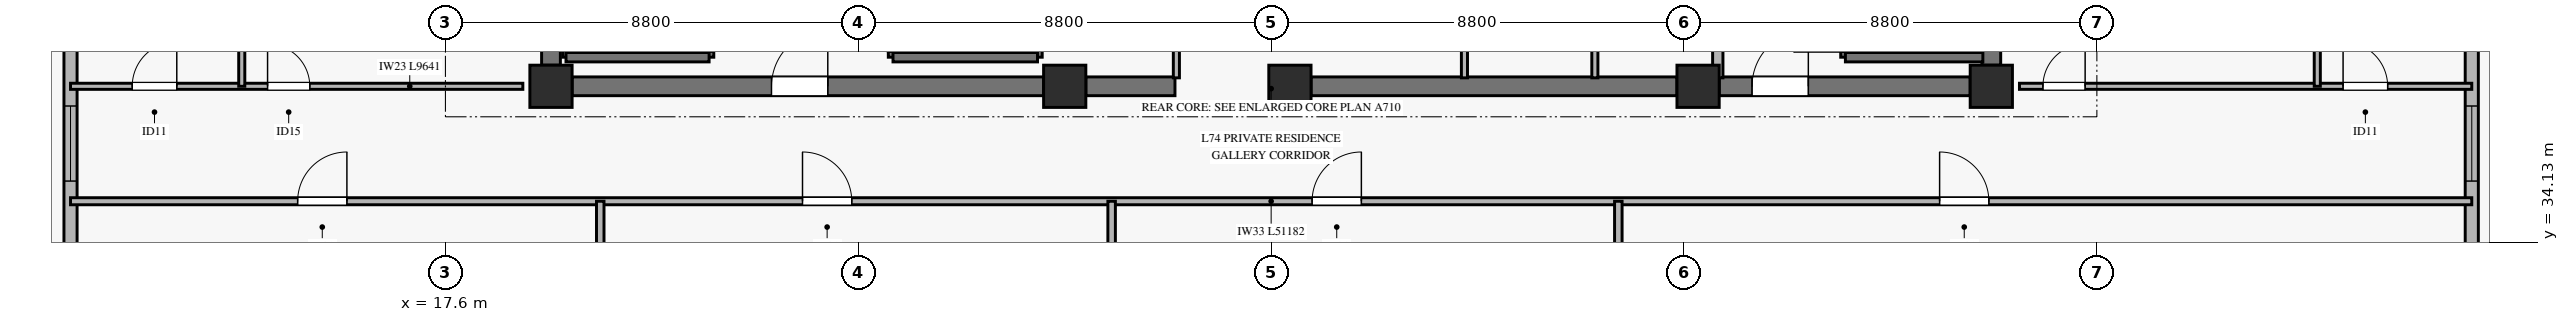
"""IFC4 building model, lengths in metres.
Left out: names, types, materials, properties, quantities, classifications, styles, units other than length and angle.
Written with IfcOpenShell. Run it as: python <this file> out.ifc"""

import sys

from ifc_helpers import new_model, si_unit, direction, frame, frame_2d, origin, origin_2d, place, context, subcontext, project, spatial, rectangle, extrude, source, transform, mapped, element, fill, save


model = new_model("IFC4")
c1 = context("Model", 3, precision=1e-05, world=origin(), true_north=direction((0.0, 1.0)))
c2 = subcontext(c1, "Body", "Model", "MODEL_VIEW")
j1 = project(units=[si_unit("LENGTHUNIT", "METRE"), si_unit("PLANEANGLEUNIT", "RADIAN")], contexts=[c1])
p1 = place(None, origin())
s1 = spatial("IfcSite", under=j1, at=p1, CompositionType="ELEMENT")
p2 = place(p1, origin())
s2 = spatial("IfcBuilding", under=s1, at=p2, CompositionType="ELEMENT")
p3 = place(p2, frame((0.0, 0.0, 290.4)))
s3 = spatial("IfcBuildingStorey", under=s2, at=p3, CompositionType="ELEMENT", Elevation=290.4)
m1 = source(origin(), c2, "Body", "SweptSolid", [
    extrude(rectangle(XDim=0.9, YDim=0.9, at=origin_2d()), origin(), (0.0, 0.0, 1.0), 3.185),
])
for number, where, z_axis, x_axis in (
    (1, (19.85, 37.45, 0.0), (0.0, 0.0, 1.0), (1.0, 0.0, 0.0)),
    (2, (30.8, 37.45, 0.0), (0.0, 0.0, 1.0), (1.0, 0.0, 0.0)),
    (3, (35.6, 37.45, 0.0), (0.0, 0.0, 1.0), (1.0, 0.0, 0.0)),
    (4, (44.3, 37.45, 0.0), (0.0, 0.0, 1.0), (1.0, 0.0, 0.0)),
    (5, (50.55, 37.45, 0.0), (0.0, 0.0, 1.0), (1.0, 0.0, 0.0)),
):
    element("IfcColumn", number, at=place(p3, frame(where, z_axis=z_axis, x_axis=x_axis)), inside=s3, PredefinedType="PILASTER", context=c2, shape_type="MappedRepresentation", body=[
        mapped(m1, transform((0.0, 0.0, 0.0), x_axis=(1.0, 0.0, 0.0), y_axis=(0.0, 1.0, 0.0), z_axis=(0.0, 0.0, 1.0), scale=1.0)),
    ])
p4 = place(p3, frame((20.3, 37.45, 0.0), z_axis=(0.0, 0.0, 1.0), x_axis=(1.0, 0.0, 0.0)))
e6 = element("IfcWall", 6, at=p4, inside=s3, PredefinedType="SHEAR", context=c2, shape_type="SweptSolid", body=[
    extrude(rectangle(XDim=10.05, YDim=0.4, at=frame_2d((5.025, 0.0))), origin(), (0.0, 0.0, 1.0), 3.185),
])
p5 = place(p4, frame((4.25, 0.0, 0.0)))
e7 = element("IfcOpeningElement", 7, at=p5, cuts=e6, PredefinedType="OPENING", context=c2, shape_type="SweptSolid", body=[
    extrude(rectangle(XDim=1.2, YDim=2.15, at=frame_2d((0.6, 1.075))), frame((0.0, 0.21, 0.0), z_axis=(0.0, -1.0, 0.0), x_axis=(1.0, 0.0, 0.0)), (0.0, 0.0, 1.0), 0.42),
])
p6 = place(p3, frame((31.25, 37.45, 0.0), z_axis=(0.0, 0.0, 1.0), x_axis=(1.0, 0.0, 0.0)))
e8 = element("IfcWall", 8, at=p6, inside=s3, PredefinedType="SHEAR", context=c2, shape_type="SweptSolid", body=[
    extrude(rectangle(XDim=1.9, YDim=0.4, at=frame_2d((0.95, 0.0))), origin(), (0.0, 0.0, 1.0), 3.185),
])
p7 = place(p3, frame((36.05, 37.45, 0.0), z_axis=(0.0, 0.0, 1.0), x_axis=(1.0, 0.0, 0.0)))
e9 = element("IfcWall", 9, at=p7, inside=s3, PredefinedType="SHEAR", context=c2, shape_type="SweptSolid", body=[
    extrude(rectangle(XDim=7.8, YDim=0.4, at=frame_2d((3.9, 0.0))), origin(), (0.0, 0.0, 1.0), 3.185),
])
p8 = place(p3, frame((44.75, 37.45, 0.0), z_axis=(0.0, 0.0, 1.0), x_axis=(1.0, 0.0, 0.0)))
e10 = element("IfcWall", 10, at=p8, inside=s3, PredefinedType="SHEAR", context=c2, shape_type="SweptSolid", body=[
    extrude(rectangle(XDim=5.35, YDim=0.4, at=frame_2d((2.675, 0.0))), origin(), (0.0, 0.0, 1.0), 3.185),
])
p9 = place(p8, frame((0.7, 0.0, 0.0)))
e11 = element("IfcOpeningElement", 11, at=p9, cuts=e10, PredefinedType="OPENING", context=c2, shape_type="SweptSolid", body=[
    extrude(rectangle(XDim=1.2, YDim=2.15, at=frame_2d((0.6, 1.075))), frame((0.0, 0.21, 0.0), z_axis=(0.0, -1.0, 0.0), x_axis=(1.0, 0.0, 0.0)), (0.0, 0.0, 1.0), 0.42),
])
for number, where, z_axis, x_axis in (
    (12, (19.85, 37.9, 0.0), (0.0, 0.0, 1.0), (0.0, 1.0, 0.0)),
    (13, (50.55, 37.9, 0.0), (0.0, 0.0, 1.0), (0.0, 1.0, 0.0)),
):
    element("IfcWall", number, at=place(p3, frame(where, z_axis=z_axis, x_axis=x_axis)), inside=s3, PredefinedType="SHEAR", context=c2, shape_type="SweptSolid", body=[
        extrude(rectangle(XDim=8.2, YDim=0.4, at=frame_2d((4.1, 0.0))), origin(), (0.0, 0.0, 1.0), 3.185),
    ])
p10 = place(p3, frame((9.609, 32.229, 0.0), z_axis=(0.0, 0.0, 1.0), x_axis=(0.0, 1.0, 0.0)))
e14 = element("IfcWall", 14, at=p10, inside=s3, PredefinedType="SOLIDWALL", context=c2, shape_type="SweptSolid", body=[
    extrude(rectangle(XDim=11.393, YDim=0.28, at=frame_2d((5.697, 0.0))), origin(), (0.0, 0.0, 1.0), 2.815),
])
p11 = place(p10, frame((3.201, 0.0, 0.45)))
e15 = element("IfcOpeningElement", 15, at=p11, cuts=e14, PredefinedType="OPENING", context=c2, shape_type="SweptSolid", body=[
    extrude(rectangle(XDim=1.6, YDim=2.0, at=frame_2d((0.8, 1.0))), frame((0.0, 0.15, 0.0), z_axis=(0.0, -1.0, 0.0), x_axis=(1.0, 0.0, 0.0)), (0.0, 0.0, 1.0), 0.3),
])
p12 = place(p3, frame((60.791, 32.229, 0.0), z_axis=(0.0, 0.0, 1.0), x_axis=(0.0, 1.0, 0.0)))
e16 = element("IfcWall", 16, at=p12, inside=s3, PredefinedType="SOLIDWALL", context=c2, shape_type="SweptSolid", body=[
    extrude(rectangle(XDim=11.393, YDim=0.28, at=frame_2d((5.697, 0.0))), origin(), (0.0, 0.0, 1.0), 2.815),
])
p13 = place(p12, frame((3.201, 0.0, 0.45)))
e17 = element("IfcOpeningElement", 17, at=p13, cuts=e16, PredefinedType="OPENING", context=c2, shape_type="SweptSolid", body=[
    extrude(rectangle(XDim=1.6, YDim=2.0, at=frame_2d((0.8, 1.0))), frame((0.0, 0.15, 0.0), z_axis=(0.0, -1.0, 0.0), x_axis=(1.0, 0.0, 0.0)), (0.0, 0.0, 1.0), 0.3),
])
p14 = place(p3, frame((20.17, 38.07, 0.0), z_axis=(0.0, 0.0, 1.0), x_axis=(0.0, 1.0, 0.0)))
e18 = element("IfcWall", 18, at=p14, inside=s3, PredefinedType="SOLIDWALL", context=c2, shape_type="SweptSolid", body=[
    extrude(rectangle(XDim=7.25, YDim=0.14, at=frame_2d((3.625, 0.0))), origin(), (0.0, 0.0, 1.0), 3.4),
])
p15 = place(p3, frame((23.22, 38.07, 0.0), z_axis=(0.0, 0.0, 1.0), x_axis=(0.0, 1.0, 0.0)))
e19 = element("IfcWall", 19, at=p15, inside=s3, PredefinedType="SOLIDWALL", context=c2, shape_type="SweptSolid", body=[
    extrude(rectangle(XDim=7.25, YDim=0.2, at=frame_2d((3.625, 0.0))), origin(), (0.0, 0.0, 1.0), 3.4),
])
p16 = place(p15, frame((0.11, 0.0, 0.0)))
e20 = element("IfcOpeningElement", 20, at=p16, cuts=e19, PredefinedType="OPENING", context=c2, shape_type="SweptSolid", body=[
    extrude(rectangle(XDim=1.1, YDim=2.15, at=frame_2d((0.55, 1.075))), frame((0.0, 0.11, 0.0), z_axis=(0.0, -1.0, 0.0), x_axis=(1.0, 0.0, 0.0)), (0.0, 0.0, 1.0), 0.22),
])
p17 = place(p3, frame((20.17, 38.07, 0.0), z_axis=(0.0, 0.0, 1.0), x_axis=(1.0, 0.0, 0.0)))
e21 = element("IfcWall", 21, at=p17, inside=s3, PredefinedType="SOLIDWALL", context=c2, shape_type="SweptSolid", body=[
    extrude(rectangle(XDim=3.05, YDim=0.2, at=frame_2d((1.525, 0.0))), origin(), (0.0, 0.0, 1.0), 3.4),
])
p18 = place(p3, frame((27.14, 38.07, 0.0), z_axis=(0.0, 0.0, 1.0), x_axis=(0.0, 1.0, 0.0)))
e22 = element("IfcWall", 22, at=p18, inside=s3, PredefinedType="SOLIDWALL", context=c2, shape_type="SweptSolid", body=[
    extrude(rectangle(XDim=7.25, YDim=0.2, at=frame_2d((3.625, 0.0))), origin(), (0.0, 0.0, 1.0), 3.4),
])
p19 = place(p18, frame((0.11, 0.0, 0.0)))
e23 = element("IfcOpeningElement", 23, at=p19, cuts=e22, PredefinedType="OPENING", context=c2, shape_type="SweptSolid", body=[
    extrude(rectangle(XDim=1.1, YDim=2.15, at=frame_2d((0.55, 1.075))), frame((0.0, 0.11, 0.0), z_axis=(0.0, -1.0, 0.0), x_axis=(1.0, 0.0, 0.0)), (0.0, 0.0, 1.0), 0.22),
])
p20 = place(p3, frame((30.22, 38.07, 0.0), z_axis=(0.0, 0.0, 1.0), x_axis=(0.0, 1.0, 0.0)))
e24 = element("IfcWall", 24, at=p20, inside=s3, PredefinedType="SOLIDWALL", context=c2, shape_type="SweptSolid", body=[
    extrude(rectangle(XDim=7.25, YDim=0.2, at=frame_2d((3.625, 0.0))), origin(), (0.0, 0.0, 1.0), 3.4),
])
p21 = place(p3, frame((27.14, 38.07, 0.0), z_axis=(0.0, 0.0, 1.0), x_axis=(1.0, 0.0, 0.0)))
e25 = element("IfcWall", 25, at=p21, inside=s3, PredefinedType="SOLIDWALL", context=c2, shape_type="SweptSolid", body=[
    extrude(rectangle(XDim=3.08, YDim=0.2, at=frame_2d((1.54, 0.0))), origin(), (0.0, 0.0, 1.0), 3.4),
])
p22 = place(p3, frame((47.44, 38.07, 0.0), z_axis=(0.0, 0.0, 1.0), x_axis=(0.0, 1.0, 0.0)))
e26 = element("IfcWall", 26, at=p22, inside=s3, PredefinedType="SOLIDWALL", context=c2, shape_type="SweptSolid", body=[
    extrude(rectangle(XDim=7.25, YDim=0.2, at=frame_2d((3.625, 0.0))), origin(), (0.0, 0.0, 1.0), 3.4),
])
p23 = place(p22, frame((0.11, 0.0, 0.0)))
e27 = element("IfcOpeningElement", 27, at=p23, cuts=e26, PredefinedType="OPENING", context=c2, shape_type="SweptSolid", body=[
    extrude(rectangle(XDim=1.1, YDim=2.15, at=frame_2d((0.55, 1.075))), frame((0.0, 0.11, 0.0), z_axis=(0.0, -1.0, 0.0), x_axis=(1.0, 0.0, 0.0)), (0.0, 0.0, 1.0), 0.22),
])
p24 = place(p3, frame((47.44, 38.07, 0.0), z_axis=(0.0, 0.0, 1.0), x_axis=(1.0, 0.0, 0.0)))
e28 = element("IfcWall", 28, at=p24, inside=s3, PredefinedType="SOLIDWALL", context=c2, shape_type="SweptSolid", body=[
    extrude(rectangle(XDim=2.93, YDim=0.2, at=frame_2d((1.465, 0.0))), origin(), (0.0, 0.0, 1.0), 3.4),
])
p25 = place(p3, frame((44.72, 37.63, 0.0), z_axis=(0.0, 0.0, 1.0), x_axis=(0.0, 1.0, 0.0)))
e29 = element("IfcWall", 29, at=p25, inside=s3, PredefinedType="SOLIDWALL", context=c2, shape_type="SweptSolid", body=[
    extrude(rectangle(XDim=7.59, YDim=0.22, at=frame_2d((3.795, 0.0))), origin(), (0.0, 0.0, 1.0), 3.185),
])
p26 = place(p3, frame((33.18, 37.63, 0.0), z_axis=(0.0, 0.0, 1.0), x_axis=(0.0, 1.0, 0.0)))
e30 = element("IfcWall", 30, at=p26, inside=s3, PredefinedType="PARTITIONING", context=c2, shape_type="SweptSolid", body=[
    extrude(rectangle(XDim=6.52, YDim=0.13, at=frame_2d((3.26, 0.0))), origin(), (0.0, 0.0, 1.0), 2.27),
])
p27 = place(p26, frame((0.97, 0.0, 0.0)))
e31 = element("IfcOpeningElement", 31, at=p27, cuts=e30, PredefinedType="OPENING", context=c2, shape_type="SweptSolid", body=[
    extrude(rectangle(XDim=0.9, YDim=2.1, at=frame_2d((0.45, 1.05))), frame((0.0, 0.075, 0.0), z_axis=(0.0, -1.0, 0.0), x_axis=(1.0, 0.0, 0.0)), (0.0, 0.0, 1.0), 0.15),
])
p28 = place(p26, frame((3.87, 0.0, 0.0)))
e32 = element("IfcOpeningElement", 32, at=p28, cuts=e30, PredefinedType="OPENING", context=c2, shape_type="SweptSolid", body=[
    extrude(rectangle(XDim=0.9, YDim=2.1, at=frame_2d((0.45, 1.05))), frame((0.0, 0.075, 0.0), z_axis=(0.0, -1.0, 0.0), x_axis=(1.0, 0.0, 0.0)), (0.0, 0.0, 1.0), 0.15),
])
p29 = place(p3, frame((39.32, 37.63, 0.0), z_axis=(0.0, 0.0, 1.0), x_axis=(0.0, 1.0, 0.0)))
e33 = element("IfcWall", 33, at=p29, inside=s3, PredefinedType="PARTITIONING", context=c2, shape_type="SweptSolid", body=[
    extrude(rectangle(XDim=8.74, YDim=0.13, at=frame_2d((4.37, 0.0))), origin(), (0.0, 0.0, 1.0), 3.185),
])
p30 = place(p29, frame((4.89, 0.0, 0.0)))
e34 = element("IfcOpeningElement", 34, at=p30, cuts=e33, PredefinedType="OPENING", context=c2, shape_type="SweptSolid", body=[
    extrude(rectangle(XDim=0.9, YDim=2.1, at=frame_2d((0.45, 1.05))), frame((0.0, 0.075, 0.0), z_axis=(0.0, -1.0, 0.0), x_axis=(1.0, 0.0, 0.0)), (0.0, 0.0, 1.0), 0.15),
])
p31 = place(p3, frame((42.1, 37.63, 0.0), z_axis=(0.0, 0.0, 1.0), x_axis=(0.0, 1.0, 0.0)))
e35 = element("IfcWall", 35, at=p31, inside=s3, PredefinedType="PARTITIONING", context=c2, shape_type="SweptSolid", body=[
    extrude(rectangle(XDim=8.74, YDim=0.13, at=frame_2d((4.37, 0.0))), origin(), (0.0, 0.0, 1.0), 3.185),
])
p32 = place(p31, frame((2.17, 0.0, 0.0)))
e36 = element("IfcOpeningElement", 36, at=p32, cuts=e35, PredefinedType="OPENING", context=c2, shape_type="SweptSolid", body=[
    extrude(rectangle(XDim=0.9, YDim=2.1, at=frame_2d((0.45, 1.05))), frame((0.0, 0.075, 0.0), z_axis=(0.0, -1.0, 0.0), x_axis=(1.0, 0.0, 0.0)), (0.0, 0.0, 1.0), 0.15),
])
p33 = place(p3, frame((9.609, 35.0, 0.0), z_axis=(0.0, 0.0, 1.0), x_axis=(1.0, 0.0, 0.0)))
e37 = element("IfcWall", 37, at=p33, inside=s3, PredefinedType="PARTITIONING", context=c2, shape_type="SweptSolid", body=[
    extrude(rectangle(XDim=51.182, YDim=0.15, at=frame_2d((25.591, 0.0))), origin(), (0.0, 0.0, 1.0), 2.47),
])
p34 = place(p33, frame((4.841, 0.0, 0.0)))
e38 = element("IfcOpeningElement", 38, at=p34, cuts=e37, PredefinedType="OPENING", context=c2, shape_type="SweptSolid", body=[
    extrude(rectangle(XDim=1.05, YDim=2.15, at=frame_2d((0.525, 1.075))), frame((0.0, 0.085, 0.0), z_axis=(0.0, -1.0, 0.0), x_axis=(1.0, 0.0, 0.0)), (0.0, 0.0, 1.0), 0.17),
])
p35 = place(p33, frame((15.602, 0.0, 0.0)))
e39 = element("IfcOpeningElement", 39, at=p35, cuts=e37, PredefinedType="OPENING", context=c2, shape_type="SweptSolid", body=[
    extrude(rectangle(XDim=1.05, YDim=2.15, at=frame_2d((0.525, 1.075))), frame((0.0, 0.085, 0.0), z_axis=(0.0, -1.0, 0.0), x_axis=(1.0, 0.0, 0.0)), (0.0, 0.0, 1.0), 0.17),
])
p36 = place(p33, frame((26.464, 0.0, 0.0)))
e40 = element("IfcOpeningElement", 40, at=p36, cuts=e37, PredefinedType="OPENING", context=c2, shape_type="SweptSolid", body=[
    extrude(rectangle(XDim=1.05, YDim=2.15, at=frame_2d((0.525, 1.075))), frame((0.0, 0.085, 0.0), z_axis=(0.0, -1.0, 0.0), x_axis=(1.0, 0.0, 0.0)), (0.0, 0.0, 1.0), 0.17),
])
p37 = place(p33, frame((39.839, 0.0, 0.0)))
e41 = element("IfcOpeningElement", 41, at=p37, cuts=e37, PredefinedType="OPENING", context=c2, shape_type="SweptSolid", body=[
    extrude(rectangle(XDim=1.05, YDim=2.15, at=frame_2d((0.525, 1.075))), frame((0.0, 0.085, 0.0), z_axis=(0.0, -1.0, 0.0), x_axis=(1.0, 0.0, 0.0)), (0.0, 0.0, 1.0), 0.17),
])
for number, where, z_axis, x_axis in (
    (42, (20.9, 17.908, 0.0), (0.0, 0.0, 1.0), (0.0, 1.0, 0.0)),
    (43, (31.8, 17.908, 0.0), (0.0, 0.0, 1.0), (0.0, 1.0, 0.0)),
    (44, (42.6, 17.908, 0.0), (0.0, 0.0, 1.0), (0.0, 1.0, 0.0)),
):
    element("IfcWall", number, at=place(p3, frame(where, z_axis=z_axis, x_axis=x_axis)), inside=s3, PredefinedType="PARTITIONING", context=c2, shape_type="SweptSolid", body=[
        extrude(rectangle(XDim=17.092, YDim=0.16, at=frame_2d((8.546, 0.0))), origin(), (0.0, 0.0, 1.0), 2.77),
    ])
p38 = place(p3, frame((9.609, 37.45, 0.0), z_axis=(0.0, 0.0, 1.0), x_axis=(1.0, 0.0, 0.0)))
e45 = element("IfcWall", 45, at=p38, inside=s3, PredefinedType="PARTITIONING", context=c2, shape_type="SweptSolid", body=[
    extrude(rectangle(XDim=9.641, YDim=0.13, at=frame_2d((4.821, 0.0))), origin(), (0.0, 0.0, 1.0), 2.82),
])
p39 = place(p38, frame((1.315, 0.0, 0.0)))
e46 = element("IfcOpeningElement", 46, at=p39, cuts=e45, PredefinedType="OPENING", context=c2, shape_type="SweptSolid", body=[
    extrude(rectangle(XDim=0.95, YDim=2.1, at=frame_2d((0.475, 1.05))), frame((0.0, 0.075, 0.0), z_axis=(0.0, -1.0, 0.0), x_axis=(1.0, 0.0, 0.0)), (0.0, 0.0, 1.0), 0.15),
])
p40 = place(p38, frame((4.2, 0.0, 0.0)))
e47 = element("IfcOpeningElement", 47, at=p40, cuts=e45, PredefinedType="OPENING", context=c2, shape_type="SweptSolid", body=[
    extrude(rectangle(XDim=0.9, YDim=2.1, at=frame_2d((0.45, 1.05))), frame((0.0, 0.075, 0.0), z_axis=(0.0, -1.0, 0.0), x_axis=(1.0, 0.0, 0.0)), (0.0, 0.0, 1.0), 0.15),
])
p41 = place(p3, frame((13.259, 37.45, 0.0), z_axis=(0.0, 0.0, 1.0), x_axis=(0.0, 1.0, 0.0)))
e48 = element("IfcWall", 48, at=p41, inside=s3, PredefinedType="PARTITIONING", context=c2, shape_type="SweptSolid", body=[
    extrude(rectangle(XDim=8.8, YDim=0.13, at=frame_2d((4.4, 0.0))), origin(), (0.0, 0.0, 1.0), 3.185),
])
p42 = place(p3, frame((51.15, 37.45, 0.0), z_axis=(0.0, 0.0, 1.0), x_axis=(1.0, 0.0, 0.0)))
e49 = element("IfcWall", 49, at=p42, inside=s3, PredefinedType="PARTITIONING", context=c2, shape_type="SweptSolid", body=[
    extrude(rectangle(XDim=9.641, YDim=0.13, at=frame_2d((4.821, 0.0))), origin(), (0.0, 0.0, 1.0), 2.82),
])
p43 = place(p42, frame((0.5, 0.0, 0.0)))
e50 = element("IfcOpeningElement", 50, at=p43, cuts=e49, PredefinedType="OPENING", context=c2, shape_type="SweptSolid", body=[
    extrude(rectangle(XDim=0.9, YDim=2.1, at=frame_2d((0.45, 1.05))), frame((0.0, 0.075, 0.0), z_axis=(0.0, -1.0, 0.0), x_axis=(1.0, 0.0, 0.0)), (0.0, 0.0, 1.0), 0.15),
])
p44 = place(p42, frame((6.898, 0.0, 0.0)))
e51 = element("IfcOpeningElement", 51, at=p44, cuts=e49, PredefinedType="OPENING", context=c2, shape_type="SweptSolid", body=[
    extrude(rectangle(XDim=0.95, YDim=2.1, at=frame_2d((0.475, 1.05))), frame((0.0, 0.075, 0.0), z_axis=(0.0, -1.0, 0.0), x_axis=(1.0, 0.0, 0.0)), (0.0, 0.0, 1.0), 0.15),
])
p45 = place(p3, frame((57.498, 37.45, 0.0), z_axis=(0.0, 0.0, 1.0), x_axis=(0.0, 1.0, 0.0)))
e52 = element("IfcWall", 52, at=p45, inside=s3, PredefinedType="PARTITIONING", context=c2, shape_type="SweptSolid", body=[
    extrude(rectangle(XDim=8.8, YDim=0.13, at=frame_2d((4.4, 0.0))), origin(), (0.0, 0.0, 1.0), 2.82),
])
m2 = source(origin(), c2, "Body", "SweptSolid", [
    extrude(rectangle(XDim=1.6, YDim=2.0, at=frame_2d((0.8, 1.0))), frame((0.0, 0.03, 0.0), z_axis=(0.0, -1.0, 0.0), x_axis=(1.0, 0.0, 0.0)), (0.0, 0.0, 1.0), 0.06),
])
p46 = place(p11, origin())
e53 = element("IfcWindow", 53, at=p46, inside=s3, PartitioningType="SINGLE_PANEL", PredefinedType="WINDOW", context=c2, shape_type="MappedRepresentation", body=[
    mapped(m2, transform((0.0, 0.0, 0.0), x_axis=(1.0, 0.0, 0.0), y_axis=(0.0, 1.0, 0.0), z_axis=(0.0, 0.0, 1.0), scale=1.0)),
])
fill(e15, e53)
p47 = place(p13, origin())
e54 = element("IfcWindow", 54, at=p47, inside=s3, PartitioningType="SINGLE_PANEL", PredefinedType="WINDOW", context=c2, shape_type="MappedRepresentation", body=[
    mapped(m2, transform((0.0, 0.0, 0.0), x_axis=(1.0, 0.0, 0.0), y_axis=(0.0, 1.0, 0.0), z_axis=(0.0, 0.0, 1.0), scale=1.0)),
])
fill(e17, e54)
m3 = source(origin(), c2, "Body", "SweptSolid", [
    extrude(rectangle(XDim=1.2, YDim=2.15, at=frame_2d((0.6, 1.075))), frame((0.0, 0.025, 0.0), z_axis=(0.0, -1.0, 0.0), x_axis=(1.0, 0.0, 0.0)), (0.0, 0.0, 1.0), 0.05),
])
p48 = place(p5, origin())
e55 = element("IfcDoor", 55, at=p48, inside=s3, OperationType="SINGLE_SWING_RIGHT", PredefinedType="DOOR", context=c2, shape_type="MappedRepresentation", body=[
    mapped(m3, transform((0.0, 0.0, 0.0), x_axis=(1.0, 0.0, 0.0), y_axis=(0.0, 1.0, 0.0), z_axis=(0.0, 0.0, 1.0), scale=1.0)),
])
fill(e7, e55)
p49 = place(p9, origin())
e56 = element("IfcDoor", 56, at=p49, inside=s3, OperationType="SINGLE_SWING_RIGHT", PredefinedType="DOOR", context=c2, shape_type="MappedRepresentation", body=[
    mapped(m3, transform((0.0, 0.0, 0.0), x_axis=(1.0, 0.0, 0.0), y_axis=(0.0, 1.0, 0.0), z_axis=(0.0, 0.0, 1.0), scale=1.0)),
])
fill(e11, e56)
m4 = source(origin(), c2, "Body", "SweptSolid", [
    extrude(rectangle(XDim=1.05, YDim=2.15, at=frame_2d((0.525, 1.075))), frame((0.0, 0.025, 0.0), z_axis=(0.0, -1.0, 0.0), x_axis=(1.0, 0.0, 0.0)), (0.0, 0.0, 1.0), 0.05),
])
p50 = place(p34, origin())
e57 = element("IfcDoor", 57, at=p50, inside=s3, OperationType="SINGLE_SWING_RIGHT", PredefinedType="DOOR", context=c2, shape_type="MappedRepresentation", body=[
    mapped(m4, transform((0.0, 0.0, 0.0), x_axis=(1.0, 0.0, 0.0), y_axis=(0.0, 1.0, 0.0), z_axis=(0.0, 0.0, 1.0), scale=1.0)),
])
fill(e38, e57)
p51 = place(p35, origin())
e58 = element("IfcDoor", 58, at=p51, inside=s3, OperationType="SINGLE_SWING_LEFT", PredefinedType="DOOR", context=c2, shape_type="MappedRepresentation", body=[
    mapped(m4, transform((0.0, 0.0, 0.0), x_axis=(1.0, 0.0, 0.0), y_axis=(0.0, 1.0, 0.0), z_axis=(0.0, 0.0, 1.0), scale=1.0)),
])
fill(e39, e58)
p52 = place(p36, origin())
e59 = element("IfcDoor", 59, at=p52, inside=s3, OperationType="SINGLE_SWING_RIGHT", PredefinedType="DOOR", context=c2, shape_type="MappedRepresentation", body=[
    mapped(m4, transform((0.0, 0.0, 0.0), x_axis=(1.0, 0.0, 0.0), y_axis=(0.0, 1.0, 0.0), z_axis=(0.0, 0.0, 1.0), scale=1.0)),
])
fill(e40, e59)
p53 = place(p37, origin())
e60 = element("IfcDoor", 60, at=p53, inside=s3, OperationType="SINGLE_SWING_LEFT", PredefinedType="DOOR", context=c2, shape_type="MappedRepresentation", body=[
    mapped(m4, transform((0.0, 0.0, 0.0), x_axis=(1.0, 0.0, 0.0), y_axis=(0.0, 1.0, 0.0), z_axis=(0.0, 0.0, 1.0), scale=1.0)),
])
fill(e41, e60)
m5 = source(origin(), c2, "Body", "SweptSolid", [
    extrude(rectangle(XDim=0.95, YDim=2.1, at=frame_2d((0.475, 1.05))), frame((0.0, 0.025, 0.0), z_axis=(0.0, -1.0, 0.0), x_axis=(1.0, 0.0, 0.0)), (0.0, 0.0, 1.0), 0.05),
])
p54 = place(p39, origin())
e61 = element("IfcDoor", 61, at=p54, inside=s3, OperationType="SINGLE_SWING_RIGHT", PredefinedType="DOOR", context=c2, shape_type="MappedRepresentation", body=[
    mapped(m5, transform((0.0, 0.0, 0.0), x_axis=(1.0, 0.0, 0.0), y_axis=(0.0, 1.0, 0.0), z_axis=(0.0, 0.0, 1.0), scale=1.0)),
])
fill(e46, e61)
m6 = source(origin(), c2, "Body", "SweptSolid", [
    extrude(rectangle(XDim=0.9, YDim=2.1, at=frame_2d((0.45, 1.05))), frame((0.0, 0.025, 0.0), z_axis=(0.0, -1.0, 0.0), x_axis=(1.0, 0.0, 0.0)), (0.0, 0.0, 1.0), 0.05),
])
p55 = place(p40, origin())
e62 = element("IfcDoor", 62, at=p55, inside=s3, OperationType="SINGLE_SWING_LEFT", PredefinedType="DOOR", context=c2, shape_type="MappedRepresentation", body=[
    mapped(m6, transform((0.0, 0.0, 0.0), x_axis=(1.0, 0.0, 0.0), y_axis=(0.0, 1.0, 0.0), z_axis=(0.0, 0.0, 1.0), scale=1.0)),
])
fill(e47, e62)
p56 = place(p43, origin())
e63 = element("IfcDoor", 63, at=p56, inside=s3, OperationType="SINGLE_SWING_RIGHT", PredefinedType="DOOR", context=c2, shape_type="MappedRepresentation", body=[
    mapped(m6, transform((0.0, 0.0, 0.0), x_axis=(1.0, 0.0, 0.0), y_axis=(0.0, 1.0, 0.0), z_axis=(0.0, 0.0, 1.0), scale=1.0)),
])
fill(e50, e63)
p57 = place(p44, origin())
e64 = element("IfcDoor", 64, at=p57, inside=s3, OperationType="SINGLE_SWING_LEFT", PredefinedType="DOOR", context=c2, shape_type="MappedRepresentation", body=[
    mapped(m5, transform((0.0, 0.0, 0.0), x_axis=(1.0, 0.0, 0.0), y_axis=(0.0, 1.0, 0.0), z_axis=(0.0, 0.0, 1.0), scale=1.0)),
])
fill(e51, e64)
save(model, sys.argv[1])
